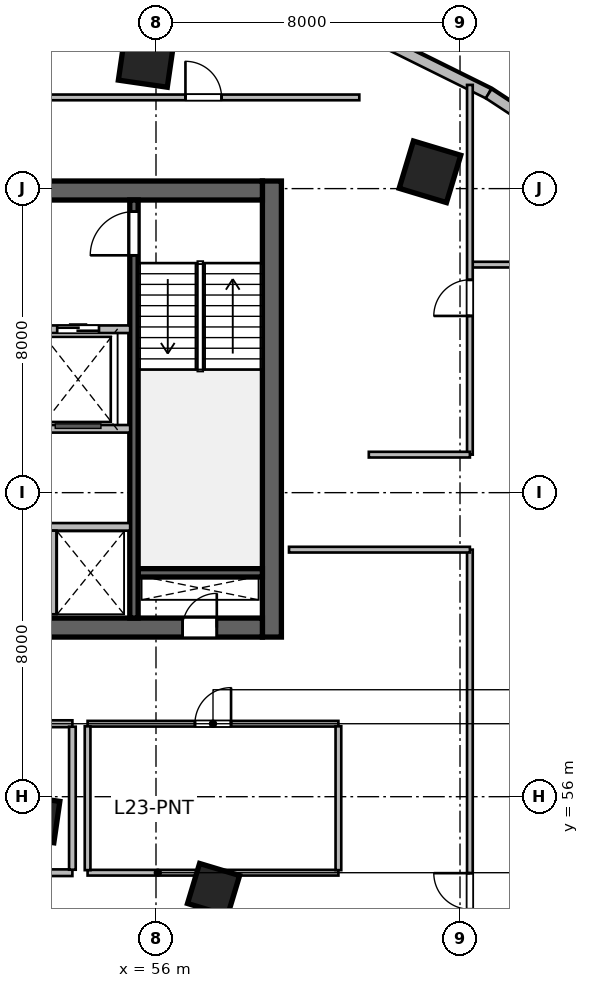
"""IFC4 building model, lengths in metres.
Left out: names, types, materials, properties, quantities, classifications, styles, units other than length and angle.
Written with IfcOpenShell. Run it as: python <this file> out.ifc"""

import sys

from ifc_helpers import new_model, si_unit, direction, frame, frame_2d, origin, origin_2d, place, context, subcontext, project, spatial, rectangle, extrude, source, transform, mapped, element, fill, save


model = new_model("IFC4")
c1 = context("Model", 3, precision=1e-05, world=origin(), true_north=direction((0.0, 1.0)))
c2 = subcontext(c1, "Body", "Model", "MODEL_VIEW")
j1 = project(units=[si_unit("LENGTHUNIT", "METRE"), si_unit("PLANEANGLEUNIT", "RADIAN")], contexts=[c1])
p1 = place(None, origin())
s1 = spatial("IfcSite", under=j1, at=p1, CompositionType="ELEMENT")
p2 = place(p1, origin())
s2 = spatial("IfcBuilding", under=s1, at=p2, CompositionType="ELEMENT")
p3 = place(p2, frame((0.0, 0.0, 99.9)))
s3 = spatial("IfcBuildingStorey", under=s2, at=p3, CompositionType="ELEMENT", Elevation=99.9)
m1 = source(origin(), c2, "Body", "SweptSolid", [
    extrude(rectangle(XDim=12.0, YDim=0.5, at=frame_2d((6.0, 0.0))), origin(), (0.0, 0.0, 1.0), 3.9),
])
p4 = place(p3, frame((59.05, 60.2, 0.0), z_axis=(0.0, 0.0, 1.0), x_axis=(0.0, 1.0, 0.0)))
e1 = element("IfcWall", 1, at=p4, inside=s3, PredefinedType="SHEAR", context=c2, shape_type="MappedRepresentation", body=[
    mapped(m1, transform((0.0, 0.0, 0.0), scale=1.0)),
])
m2 = source(origin(), c2, "Body", "SweptSolid", [
    extrude(rectangle(XDim=21.6, YDim=0.5, at=frame_2d((10.8, 0.0))), origin(), (0.0, 0.0, 1.0), 3.9),
])
p5 = place(p3, frame((37.2, 60.45, 0.0), z_axis=(0.0, 0.0, 1.0), x_axis=(1.0, 0.0, 0.0)))
e2 = element("IfcWall", 2, at=p5, inside=s3, PredefinedType="SHEAR", context=c2, shape_type="MappedRepresentation", body=[
    mapped(m2, transform((0.0, 0.0, 0.0), scale=1.0)),
])
p6 = place(p5, frame((1.1, 0.0, 0.0)))
e3 = element("IfcOpeningElement", 3, at=p6, cuts=e2, PredefinedType="OPENING", context=c2, shape_type="SweptSolid", body=[
    extrude(rectangle(XDim=1.15, YDim=2.15, at=frame_2d((0.575, 1.075))), frame((0.0, 0.26, 0.0), z_axis=(0.0, -1.0, 0.0), x_axis=(1.0, 0.0, 0.0)), (0.0, 0.0, 1.0), 0.52),
])
p7 = place(p5, frame((19.5, 0.0, 0.0)))
e4 = element("IfcOpeningElement", 4, at=p7, cuts=e2, PredefinedType="OPENING", context=c2, shape_type="SweptSolid", body=[
    extrude(rectangle(XDim=0.9, YDim=2.1, at=frame_2d((0.45, 1.05))), frame((0.0, 0.26, 0.0), z_axis=(0.0, -1.0, 0.0), x_axis=(1.0, 0.0, 0.0)), (0.0, 0.0, 1.0), 0.52),
])
p8 = place(p5, frame((12.02, 0.0, 0.0)))
e5 = element("IfcOpeningElement", 5, at=p8, cuts=e2, PredefinedType="OPENING", context=c2, shape_type="SweptSolid", body=[
    extrude(rectangle(XDim=1.6, YDim=2.15, at=frame_2d((0.8, 1.075))), frame((0.0, 0.26, 0.0), z_axis=(0.0, -1.0, 0.0), x_axis=(1.0, 0.0, 0.0)), (0.0, 0.0, 1.0), 0.52),
])
p9 = place(p3, frame((37.2, 71.95, 0.0), z_axis=(0.0, 0.0, 1.0), x_axis=(1.0, 0.0, 0.0)))
e6 = element("IfcWall", 6, at=p9, inside=s3, PredefinedType="SHEAR", context=c2, shape_type="MappedRepresentation", body=[
    mapped(m2, transform((0.0, 0.0, 0.0), scale=1.0)),
])
p10 = place(p9, frame((1.2, 0.0, 0.0)))
e7 = element("IfcOpeningElement", 7, at=p10, cuts=e6, PredefinedType="OPENING", context=c2, shape_type="SweptSolid", body=[
    extrude(rectangle(XDim=0.9, YDim=2.1, at=frame_2d((0.45, 1.05))), frame((0.0, 0.26, 0.0), z_axis=(0.0, -1.0, 0.0), x_axis=(1.0, 0.0, 0.0)), (0.0, 0.0, 1.0), 0.52),
])
p11 = place(p9, frame((14.7, 0.0, 0.0)))
e8 = element("IfcOpeningElement", 8, at=p11, cuts=e6, PredefinedType="OPENING", context=c2, shape_type="SweptSolid", body=[
    extrude(rectangle(XDim=1.2, YDim=2.15, at=frame_2d((0.6, 1.075))), frame((0.0, 0.26, 0.0), z_axis=(0.0, -1.0, 0.0), x_axis=(1.0, 0.0, 0.0)), (0.0, 0.0, 1.0), 0.52),
])
p12 = place(p9, frame((4.15, 0.0, 0.0)))
e9 = element("IfcOpeningElement", 9, at=p12, cuts=e6, PredefinedType="OPENING", context=c2, shape_type="SweptSolid", body=[
    extrude(rectangle(XDim=1.3, YDim=2.15, at=frame_2d((0.65, 1.075))), frame((0.0, 0.26, 0.0), z_axis=(0.0, -1.0, 0.0), x_axis=(1.0, 0.0, 0.0)), (0.0, 0.0, 1.0), 0.52),
])
p13 = place(p9, frame((7.1, 0.0, 0.0)))
e10 = element("IfcOpeningElement", 10, at=p13, cuts=e6, PredefinedType="OPENING", context=c2, shape_type="SweptSolid", body=[
    extrude(rectangle(XDim=0.9, YDim=2.1, at=frame_2d((0.45, 1.05))), frame((0.0, 0.26, 0.0), z_axis=(0.0, -1.0, 0.0), x_axis=(1.0, 0.0, 0.0)), (0.0, 0.0, 1.0), 0.52),
])
m3 = source(origin(), c2, "Body", "SweptSolid", [
    extrude(rectangle(XDim=3.27, YDim=0.22, at=frame_2d((1.635, 0.0))), origin(), (0.0, 0.0, 1.0), 3.9),
])
p14 = place(p3, frame((55.53, 61.89, 0.0), z_axis=(0.0, 0.0, 1.0), x_axis=(1.0, 0.0, 0.0)))
e11 = element("IfcWall", 11, at=p14, inside=s3, PredefinedType="SHEAR", context=c2, shape_type="MappedRepresentation", body=[
    mapped(m3, transform((0.0, 0.0, 0.0), scale=1.0)),
])
m4 = source(origin(), c2, "Body", "SweptSolid", [
    extrude(rectangle(XDim=11.0, YDim=0.22, at=frame_2d((5.5, 0.0))), origin(), (0.0, 0.0, 1.0), 3.9),
])
p15 = place(p3, frame((55.42, 60.7, 0.0), z_axis=(0.0, 0.0, 1.0), x_axis=(0.0, 1.0, 0.0)))
e12 = element("IfcWall", 12, at=p15, inside=s3, PredefinedType="SHEAR", context=c2, shape_type="MappedRepresentation", body=[
    mapped(m4, transform((0.0, 0.0, 0.0), scale=1.0)),
])
p16 = place(p15, frame((9.545, 0.0, 0.0)))
e13 = element("IfcOpeningElement", 13, at=p16, cuts=e12, PredefinedType="OPENING", context=c2, shape_type="SweptSolid", body=[
    extrude(rectangle(XDim=1.15, YDim=2.15, at=frame_2d((0.575, 1.075))), frame((0.0, 0.12, 0.0), z_axis=(0.0, -1.0, 0.0), x_axis=(1.0, 0.0, 0.0)), (0.0, 0.0, 1.0), 0.24),
])
m5 = source(origin(), c2, "Body", "SweptSolid", [
    extrude(rectangle(XDim=1.1, YDim=1.1, at=origin_2d()), origin(), (0.0, 0.0, 1.0), 3.9),
])
p17 = place(p3, frame((52.846, 55.411, 0.0), z_axis=(0.0, 0.0, 1.0), x_axis=(0.143492621991, 0.98965138682, 0.0)))
e14 = element("IfcColumn", 14, at=p17, inside=s3, PredefinedType="COLUMN", context=c2, shape_type="MappedRepresentation", body=[
    mapped(m5, transform((0.0, 0.0, 0.0), scale=1.0)),
])
m6 = source(origin(), c2, "Body", "SweptSolid", [
    extrude(rectangle(XDim=1.3, YDim=1.3, at=origin_2d()), origin(), (0.0, 0.0, 1.0), 3.9),
])
p18 = place(p3, frame((55.747, 75.404, 0.0), z_axis=(0.0, 0.0, 1.0), x_axis=(0.143492621991, 0.98965138682, 0.0)))
e15 = element("IfcColumn", 15, at=p18, inside=s3, PredefinedType="COLUMN", context=c2, shape_type="MappedRepresentation", body=[
    mapped(m6, transform((0.0, 0.0, 0.0), scale=1.0)),
])
p19 = place(p3, frame((57.515, 53.558, 0.0), z_axis=(0.0, 0.0, 1.0), x_axis=(0.288697611798, 0.957420330337, 0.0)))
e16 = element("IfcColumn", 16, at=p19, inside=s3, PredefinedType="COLUMN", context=c2, shape_type="MappedRepresentation", body=[
    mapped(m5, transform((0.0, 0.0, 0.0), scale=1.0)),
])
p20 = place(p3, frame((63.209, 72.442, 0.0), z_axis=(0.0, 0.0, 1.0), x_axis=(0.288697611798, 0.957420330337, 0.0)))
e17 = element("IfcColumn", 17, at=p20, inside=s3, PredefinedType="COLUMN", context=c2, shape_type="MappedRepresentation", body=[
    mapped(m6, transform((0.0, 0.0, 0.0), scale=1.0)),
])
m7 = source(origin(), c2, "Body", "SweptSolid", [
    extrude(rectangle(XDim=4.506, YDim=0.28, at=frame_2d((2.253, 0.0))), origin(), (0.0, 0.0, 1.0), 3.65),
])
p21 = place(p3, frame((60.714, 76.497, 0.0), z_axis=(0.0, 0.0, 1.0), x_axis=(0.89597155075, -0.444111450254, 0.0)))
e18 = element("IfcWall", 18, at=p21, inside=s3, PredefinedType="SOLIDWALL", context=c2, shape_type="MappedRepresentation", body=[
    mapped(m7, transform((0.0, 0.0, 0.0), scale=1.0)),
])
m8 = source(origin(), c2, "Body", "SweptSolid", [
    extrude(rectangle(XDim=4.626, YDim=0.28, at=frame_2d((2.313, 0.0))), origin(), (0.0, 0.0, 1.0), 3.65),
])
p22 = place(p3, frame((64.751, 74.496, 0.0), z_axis=(0.0, 0.0, 1.0), x_axis=(0.83595938331, -0.548791316855, 0.0)))
e19 = element("IfcWall", 19, at=p22, inside=s3, PredefinedType="SOLIDWALL", context=c2, shape_type="MappedRepresentation", body=[
    mapped(m8, transform((0.0, 0.0, 0.0), scale=1.0)),
])
m9 = source(origin(), c2, "Body", "SweptSolid", [
    extrude(rectangle(XDim=5.62, YDim=0.2, at=frame_2d((2.81, 0.0))), origin(), (0.0, 0.0, 1.0), 3.65),
])
p23 = place(p3, frame((49.7, 68.3, 0.0), z_axis=(0.0, 0.0, 1.0), x_axis=(1.0, 0.0, 0.0)))
e20 = element("IfcWall", 20, at=p23, inside=s3, PredefinedType="SOLIDWALL", context=c2, shape_type="MappedRepresentation", body=[
    mapped(m9, transform((0.0, 0.0, 0.0), scale=1.0)),
])
p24 = place(p23, frame((1.6, 0.0, 0.0)))
e21 = element("IfcOpeningElement", 21, at=p24, cuts=e20, PredefinedType="OPENING", context=c2, shape_type="SweptSolid", body=[
    extrude(rectangle(XDim=1.1, YDim=2.15, at=frame_2d((0.55, 1.075))), frame((0.0, 0.11, 0.0), z_axis=(0.0, -1.0, 0.0), x_axis=(1.0, 0.0, 0.0)), (0.0, 0.0, 1.0), 0.22),
])
p25 = place(p23, frame((3.7, 0.0, 0.0)))
e22 = element("IfcOpeningElement", 22, at=p25, cuts=e20, PredefinedType="OPENING", context=c2, shape_type="SweptSolid", body=[
    extrude(rectangle(XDim=1.1, YDim=2.15, at=frame_2d((0.55, 1.075))), frame((0.0, 0.11, 0.0), z_axis=(0.0, -1.0, 0.0), x_axis=(1.0, 0.0, 0.0)), (0.0, 0.0, 1.0), 0.22),
])
p26 = place(p3, frame((49.7, 65.68, 0.0), z_axis=(0.0, 0.0, 1.0), x_axis=(1.0, 0.0, 0.0)))
e23 = element("IfcWall", 23, at=p26, inside=s3, PredefinedType="SOLIDWALL", context=c2, shape_type="MappedRepresentation", body=[
    mapped(m9, transform((0.0, 0.0, 0.0), scale=1.0)),
])
m10 = source(origin(), c2, "Body", "SweptSolid", [
    extrude(rectangle(XDim=4.1, YDim=0.2, at=frame_2d((2.05, 0.0))), origin(), (0.0, 0.0, 1.0), 3.65),
])
p27 = place(p3, frame((51.22, 63.1, 0.0), z_axis=(0.0, 0.0, 1.0), x_axis=(1.0, 0.0, 0.0)))
e24 = element("IfcWall", 24, at=p27, inside=s3, PredefinedType="SOLIDWALL", context=c2, shape_type="MappedRepresentation", body=[
    mapped(m10, transform((0.0, 0.0, 0.0), scale=1.0)),
])
m11 = source(origin(), c2, "Body", "SweptSolid", [
    extrude(rectangle(XDim=2.2, YDim=0.2, at=frame_2d((1.1, 0.0))), origin(), (0.0, 0.0, 1.0), 3.65),
])
p28 = place(p3, frame((53.28, 60.8, 0.0), z_axis=(0.0, 0.0, 1.0), x_axis=(0.0, 1.0, 0.0)))
e25 = element("IfcWall", 25, at=p28, inside=s3, PredefinedType="SOLIDWALL", context=c2, shape_type="MappedRepresentation", body=[
    mapped(m11, transform((0.0, 0.0, 0.0), scale=1.0)),
])
m12 = source(origin(), c2, "Body", "SweptSolid", [
    extrude(rectangle(XDim=3.248, YDim=0.175, at=frame_2d((1.624, 0.0))), origin(), (0.0, 0.0, 1.0), 3.65),
])
p29 = place(p3, frame((50.552, 54.0, 0.0), z_axis=(0.0, 0.0, 1.0), x_axis=(1.0, 0.0, 0.0)))
e26 = element("IfcWall", 26, at=p29, inside=s3, PredefinedType="PARTITIONING", context=c2, shape_type="MappedRepresentation", body=[
    mapped(m12, transform((0.0, 0.0, 0.0), scale=1.0)),
])
m13 = source(origin(), c2, "Body", "SweptSolid", [
    extrude(rectangle(XDim=3.248, YDim=0.18, at=frame_2d((1.624, 0.0))), origin(), (0.0, 0.0, 1.0), 3.65),
])
p30 = place(p3, frame((50.552, 57.92, 0.0), z_axis=(0.0, 0.0, 1.0), x_axis=(1.0, 0.0, 0.0)))
e27 = element("IfcWall", 27, at=p30, inside=s3, PredefinedType="PLUMBINGWALL", context=c2, shape_type="MappedRepresentation", body=[
    mapped(m13, transform((0.0, 0.0, 0.0), scale=1.0)),
])
p31 = place(p30, frame((1.149, 0.0, 0.0)))
e28 = element("IfcOpeningElement", 28, at=p31, cuts=e27, PredefinedType="OPENING", context=c2, shape_type="SweptSolid", body=[
    extrude(rectangle(XDim=0.95, YDim=2.12, at=frame_2d((0.475, 1.06))), frame((0.0, 0.1, 0.0), z_axis=(0.0, -1.0, 0.0), x_axis=(1.0, 0.0, 0.0)), (0.0, 0.0, 1.0), 0.2),
])
m14 = source(origin(), c2, "Body", "SweptSolid", [
    extrude(rectangle(XDim=3.763, YDim=0.175, at=frame_2d((1.881, 0.0))), origin(), (0.0, 0.0, 1.0), 3.65),
])
p32 = place(p3, frame((53.8, 54.079, 0.0), z_axis=(0.0, 0.0, 1.0), x_axis=(0.0, 1.0, 0.0)))
e29 = element("IfcWall", 29, at=p32, inside=s3, PredefinedType="PARTITIONING", context=c2, shape_type="MappedRepresentation", body=[
    mapped(m14, transform((0.0, 0.0, 0.0), scale=1.0)),
])
m15 = source(origin(), c2, "Body", "SweptSolid", [
    extrude(rectangle(XDim=6.6, YDim=0.15, at=frame_2d((3.3, 0.0))), origin(), (0.0, 0.0, 1.0), 3.095),
])
p33 = place(p3, frame((54.2, 54.0, 0.0), z_axis=(0.0, 0.0, 1.0), x_axis=(1.0, 0.0, 0.0)))
e30 = element("IfcWall", 30, at=p33, inside=s3, PredefinedType="PARTITIONING", context=c2, shape_type="MappedRepresentation", body=[
    mapped(m15, transform((0.0, 0.0, 0.0), scale=1.0)),
])
m16 = source(origin(), c2, "Body", "SweptSolid", [
    extrude(rectangle(XDim=6.6, YDim=0.15, at=frame_2d((3.3, 0.0))), origin(), (0.0, 0.0, 1.0), 3.65),
])
p34 = place(p3, frame((54.2, 57.92, 0.0), z_axis=(0.0, 0.0, 1.0), x_axis=(1.0, 0.0, 0.0)))
e31 = element("IfcWall", 31, at=p34, inside=s3, PredefinedType="PARTITIONING", context=c2, shape_type="MappedRepresentation", body=[
    mapped(m16, transform((0.0, 0.0, 0.0), scale=1.0)),
])
p35 = place(p34, frame((2.825, 0.0, 0.0)))
e32 = element("IfcOpeningElement", 32, at=p35, cuts=e31, PredefinedType="OPENING", context=c2, shape_type="SweptSolid", body=[
    extrude(rectangle(XDim=0.95, YDim=2.1, at=frame_2d((0.475, 1.05))), frame((0.0, 0.085, 0.0), z_axis=(0.0, -1.0, 0.0), x_axis=(1.0, 0.0, 0.0)), (0.0, 0.0, 1.0), 0.17),
])
m17 = source(origin(), c2, "Body", "SweptSolid", [
    extrude(rectangle(XDim=3.785, YDim=0.15, at=frame_2d((1.893, 0.0))), origin(), (0.0, 0.0, 1.0), 3.65),
])
for number, where, z_axis, x_axis in (
    (33, (54.2, 54.067, 0.0), (0.0, 0.0, 1.0), (0.0, 1.0, 0.0)),
    (34, (60.8, 54.067, 0.0), (0.0, 0.0, 1.0), (0.0, 1.0, 0.0)),
):
    element("IfcWall", number, at=place(p3, frame(where, z_axis=z_axis, x_axis=x_axis)), inside=s3, PredefinedType="PARTITIONING", context=c2, shape_type="MappedRepresentation", body=[
        mapped(m17, transform((0.0, 0.0, 0.0), scale=1.0)),
    ])
m18 = source(origin(), c2, "Body", "SweptSolid", [
    extrude(rectangle(XDim=2.5, YDim=0.15, at=frame_2d((1.25, 0.0))), origin(), (0.0, 0.0, 1.0), 3.65),
])
p36 = place(p3, frame((64.3, 70.0, 0.0), z_axis=(0.0, 0.0, 1.0), x_axis=(1.0, 0.0, 0.0)))
e35 = element("IfcWall", 35, at=p36, inside=s3, PredefinedType="PARTITIONING", context=c2, shape_type="MappedRepresentation", body=[
    mapped(m18, transform((0.0, 0.0, 0.0), scale=1.0)),
])
m19 = source(origin(), c2, "Body", "SweptSolid", [
    extrude(rectangle(XDim=8.2, YDim=0.15, at=frame_2d((4.1, 0.0))), origin(), (0.0, 0.0, 1.0), 3.022),
])
p37 = place(p3, frame((53.15, 74.4, 0.0), z_axis=(0.0, 0.0, 1.0), x_axis=(1.0, 0.0, 0.0)))
e36 = element("IfcWall", 36, at=p37, inside=s3, PredefinedType="PARTITIONING", context=c2, shape_type="MappedRepresentation", body=[
    mapped(m19, transform((0.0, 0.0, 0.0), scale=1.0)),
])
p38 = place(p37, frame((3.625, 0.0, 0.0)))
e37 = element("IfcOpeningElement", 37, at=p38, cuts=e36, PredefinedType="OPENING", context=c2, shape_type="SweptSolid", body=[
    extrude(rectangle(XDim=0.95, YDim=2.1, at=frame_2d((0.475, 1.05))), frame((0.0, 0.085, 0.0), z_axis=(0.0, -1.0, 0.0), x_axis=(1.0, 0.0, 0.0)), (0.0, 0.0, 1.0), 0.17),
])
m20 = source(origin(), c2, "Body", "SweptSolid", [
    extrude(rectangle(XDim=17.974, YDim=0.15, at=frame_2d((8.987, 0.0))), origin(), (0.0, 0.0, 1.0), 2.942),
])
p39 = place(p3, frame((64.26, 44.526, 0.0), z_axis=(0.0, 0.0, 1.0), x_axis=(0.0, 1.0, 0.0)))
e38 = element("IfcWall", 38, at=p39, inside=s3, PredefinedType="PARTITIONING", context=c2, shape_type="MappedRepresentation", body=[
    mapped(m20, transform((0.0, 0.0, 0.0), scale=1.0)),
])
p40 = place(p39, frame((8.512, 0.0, 0.0)))
e39 = element("IfcOpeningElement", 39, at=p40, cuts=e38, PredefinedType="OPENING", context=c2, shape_type="SweptSolid", body=[
    extrude(rectangle(XDim=0.95, YDim=2.1, at=frame_2d((0.475, 1.05))), frame((0.0, 0.085, 0.0), z_axis=(0.0, -1.0, 0.0), x_axis=(1.0, 0.0, 0.0)), (0.0, 0.0, 1.0), 0.17),
])
m21 = source(origin(), c2, "Body", "SweptSolid", [
    extrude(rectangle(XDim=4.76, YDim=0.15, at=frame_2d((2.38, 0.0))), origin(), (0.0, 0.0, 1.0), 3.65),
])
p41 = place(p3, frame((59.5, 62.5, 0.0), z_axis=(0.0, 0.0, 1.0), x_axis=(1.0, 0.0, 0.0)))
e40 = element("IfcWall", 40, at=p41, inside=s3, PredefinedType="PARTITIONING", context=c2, shape_type="MappedRepresentation", body=[
    mapped(m21, transform((0.0, 0.0, 0.0), scale=1.0)),
])
m22 = source(origin(), c2, "Body", "SweptSolid", [
    extrude(rectangle(XDim=9.729, YDim=0.15, at=frame_2d((4.864, 0.0))), origin(), (0.0, 0.0, 1.0), 3.65),
])
p42 = place(p3, frame((64.26, 65.0, 0.0), z_axis=(0.0, 0.0, 1.0), x_axis=(0.0, 1.0, 0.0)))
e41 = element("IfcWall", 41, at=p42, inside=s3, PredefinedType="PARTITIONING", context=c2, shape_type="MappedRepresentation", body=[
    mapped(m22, transform((0.0, 0.0, 0.0), scale=1.0)),
])
p43 = place(p42, frame((3.65, 0.0, 0.0)))
e42 = element("IfcOpeningElement", 42, at=p43, cuts=e41, PredefinedType="OPENING", context=c2, shape_type="SweptSolid", body=[
    extrude(rectangle(XDim=0.95, YDim=2.1, at=frame_2d((0.475, 1.05))), frame((0.0, 0.085, 0.0), z_axis=(0.0, -1.0, 0.0), x_axis=(1.0, 0.0, 0.0)), (0.0, 0.0, 1.0), 0.17),
])
m23 = source(origin(), c2, "Body", "SweptSolid", [
    extrude(rectangle(XDim=2.66, YDim=0.15, at=frame_2d((1.33, 0.0))), origin(), (0.0, 0.0, 1.0), 3.65),
])
p44 = place(p3, frame((61.6, 65.0, 0.0), z_axis=(0.0, 0.0, 1.0), x_axis=(1.0, 0.0, 0.0)))
e43 = element("IfcWall", 43, at=p44, inside=s3, PredefinedType="PARTITIONING", context=c2, shape_type="MappedRepresentation", body=[
    mapped(m23, transform((0.0, 0.0, 0.0), scale=1.0)),
])
m24 = source(origin(), c2, "Body", "SweptSolid", [
    extrude(rectangle(XDim=0.9, YDim=2.1, at=frame_2d((0.45, 1.05))), frame((0.0, 0.025, 0.0), z_axis=(0.0, -1.0, 0.0), x_axis=(1.0, 0.0, 0.0)), (0.0, 0.0, 1.0), 0.05),
])
p45 = place(p7, origin())
e44 = element("IfcDoor", 44, at=p45, inside=s3, OperationType="SINGLE_SWING_RIGHT", PredefinedType="DOOR", context=c2, shape_type="MappedRepresentation", body=[
    mapped(m24, transform((0.0, 0.0, 0.0), scale=1.0)),
])
fill(e4, e44)
m25 = source(origin(), c2, "Body", "SweptSolid", [
    extrude(rectangle(XDim=1.15, YDim=2.15, at=frame_2d((0.575, 1.075))), frame((0.0, 0.025, 0.0), z_axis=(0.0, -1.0, 0.0), x_axis=(1.0, 0.0, 0.0)), (0.0, 0.0, 1.0), 0.05),
])
p46 = place(p16, origin())
e45 = element("IfcDoor", 45, at=p46, inside=s3, OperationType="SINGLE_SWING_LEFT", PredefinedType="DOOR", context=c2, shape_type="MappedRepresentation", body=[
    mapped(m25, transform((0.0, 0.0, 0.0), scale=1.0)),
])
fill(e13, e45)
m26 = source(origin(), c2, "Body", "SweptSolid", [
    extrude(rectangle(XDim=1.1, YDim=2.15, at=frame_2d((0.55, 1.075))), frame((0.0, 0.025, 0.0), z_axis=(0.0, -1.0, 0.0), x_axis=(1.0, 0.0, 0.0)), (0.0, 0.0, 1.0), 0.05),
])
p47 = place(p25, origin())
e46 = element("IfcDoor", 46, at=p47, inside=s3, OperationType="DOUBLE_DOOR_SLIDING", PredefinedType="DOOR", context=c2, shape_type="MappedRepresentation", body=[
    mapped(m26, transform((0.0, 0.0, 0.0), scale=1.0)),
])
fill(e22, e46)
m27 = source(origin(), c2, "Body", "SweptSolid", [
    extrude(rectangle(XDim=0.95, YDim=2.1, at=frame_2d((0.475, 1.05))), frame((0.0, 0.025, 0.0), z_axis=(0.0, -1.0, 0.0), x_axis=(1.0, 0.0, 0.0)), (0.0, 0.0, 1.0), 0.05),
])
p48 = place(p35, origin())
e47 = element("IfcDoor", 47, at=p48, inside=s3, OperationType="SINGLE_SWING_RIGHT", PredefinedType="DOOR", context=c2, shape_type="MappedRepresentation", body=[
    mapped(m27, transform((0.0, 0.0, 0.0), scale=1.0)),
])
fill(e32, e47)
p49 = place(p38, origin())
e48 = element("IfcDoor", 48, at=p49, inside=s3, OperationType="SINGLE_SWING_LEFT", PredefinedType="DOOR", context=c2, shape_type="MappedRepresentation", body=[
    mapped(m27, transform((0.0, 0.0, 0.0), scale=1.0)),
])
fill(e37, e48)
p50 = place(p40, origin())
e49 = element("IfcDoor", 49, at=p50, inside=s3, OperationType="SINGLE_SWING_RIGHT", PredefinedType="DOOR", context=c2, shape_type="MappedRepresentation", body=[
    mapped(m27, transform((0.0, 0.0, 0.0), scale=1.0)),
])
fill(e39, e49)
p51 = place(p43, origin())
e50 = element("IfcDoor", 50, at=p51, inside=s3, OperationType="SINGLE_SWING_LEFT", PredefinedType="DOOR", context=c2, shape_type="MappedRepresentation", body=[
    mapped(m27, transform((0.0, 0.0, 0.0), scale=1.0)),
])
fill(e42, e50)
save(model, sys.argv[1])
